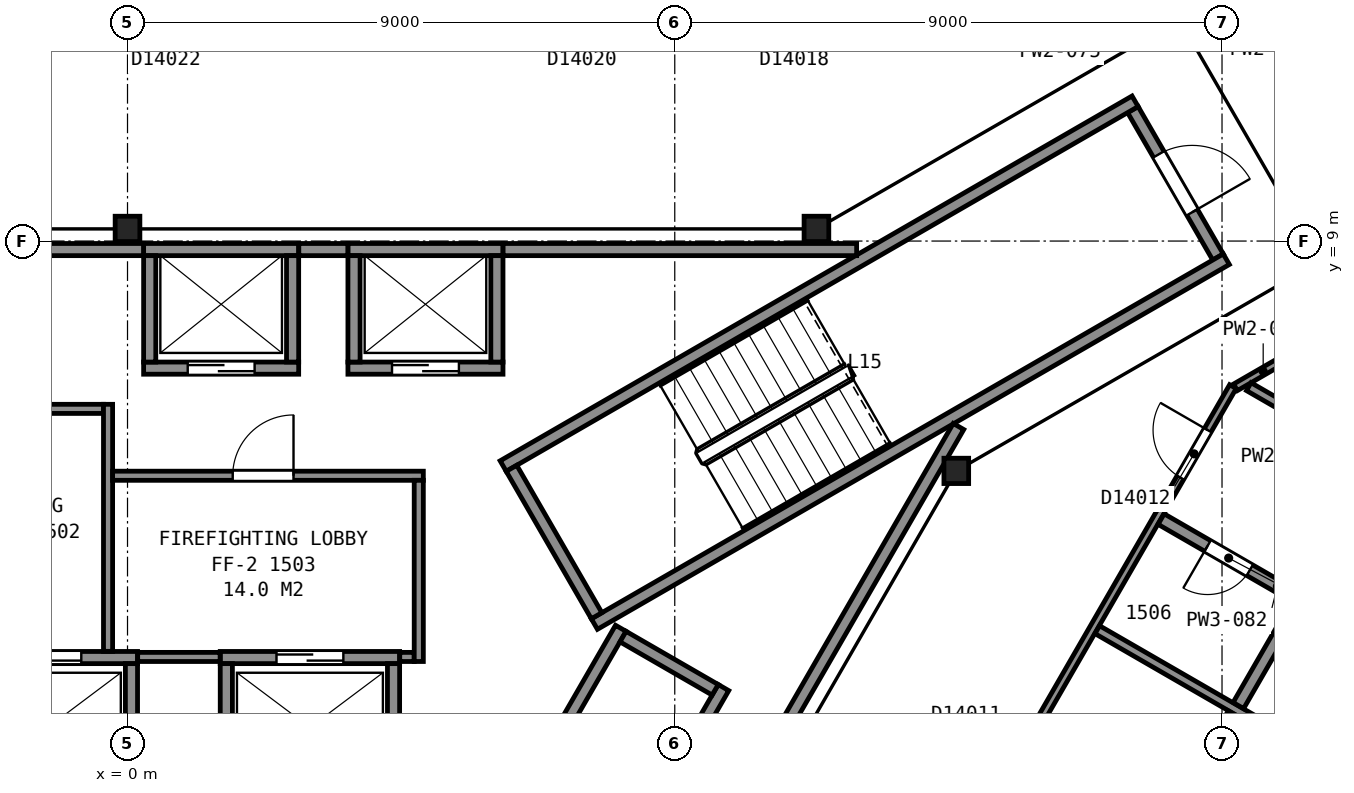
"""IFC4 building model, lengths in metres.
Left out: names, types, materials, properties, quantities, classifications, styles, units other than length and angle.
Written with IfcOpenShell. Run it as: python <this file> out.ifc"""

import sys

from ifc_helpers import new_model, si_unit, direction, frame, frame_2d, origin, origin_2d, place, context, subcontext, project, spatial, rectangle, i_section, extrude, element, fill, save


model = new_model("IFC4")
c1 = context("Model", 3, precision=1e-05, world=origin(), true_north=direction((0.0, 1.0)))
c2 = subcontext(c1, "Body", "Model", "MODEL_VIEW")
j1 = project(units=[si_unit("LENGTHUNIT", "METRE"), si_unit("PLANEANGLEUNIT", "RADIAN")], contexts=[c1])
p1 = place(None, origin())
s1 = spatial("IfcSite", under=j1, at=p1, CompositionType="ELEMENT")
p2 = place(p1, origin())
s2 = spatial("IfcBuilding", under=s1, at=p2, CompositionType="ELEMENT")
p3 = place(p2, frame((0.0, 0.0, 69.2)))
s3 = spatial("IfcBuildingStorey", under=s2, at=p3, CompositionType="ELEMENT", Elevation=69.2)
for number, where, z_axis, x_axis in (
    (1, (13.63, 5.22, 0.0), (0.0, 0.0, 1.0), (1.0, 0.0, 0.0)),
    (2, (11.33, 9.2, 0.0), (0.0, 0.0, 1.0), (1.0, 0.0, 0.0)),
    (3, (0.0, 9.2, 0.0), (0.0, 0.0, 1.0), (1.0, 0.0, 0.0)),
):
    element("IfcColumn", number, at=place(p3, frame(where, z_axis=z_axis, x_axis=x_axis)), inside=s3, PredefinedType="COLUMN", context=c2, shape_type="SweptSolid", body=[
        extrude(i_section(OverallWidth=0.406, OverallDepth=0.417, WebThickness=0.03, FlangeThickness=0.048, FilletRadius=0.015, at=origin_2d()), origin(), (0.0, 0.0, 1.0), 3.6),
    ])
p4 = place(p3, frame((17.934, 8.738, 0.0), z_axis=(0.0, 0.0, 1.0), x_axis=(-0.49998411664, 0.866034573852, 0.0)))
e4 = element("IfcWall", 4, at=p4, inside=s3, PredefinedType="PARTITIONING", context=c2, shape_type="SweptSolid", body=[
    extrude(rectangle(XDim=2.8, YDim=0.2, at=frame_2d((1.4, 0.0))), origin(), (0.0, 0.0, 1.0), 3.35),
])
p5 = place(p4, frame((0.85, 0.0, 0.0)))
e5 = element("IfcOpeningElement", 5, at=p5, cuts=e4, PredefinedType="OPENING", context=c2, shape_type="SweptSolid", body=[
    extrude(rectangle(XDim=1.1, YDim=2.1, at=frame_2d((0.55, 1.05))), frame((0.0, 0.11, 0.0), z_axis=(0.0, -1.0, 0.0), x_axis=(1.0, 0.0, 0.0)), (0.0, 0.0, 1.0), 0.22),
])
for number, where, z_axis, x_axis in (
    (6, (6.178, 5.299, 0.0), (0.0, 0.0, 1.0), (0.866, 0.5, 0.0)),
    (7, (7.678, 2.701, 0.0), (0.0, 0.0, 1.0), (0.866, 0.5, 0.0)),
):
    element("IfcWall", number, at=place(p3, frame(where, z_axis=z_axis, x_axis=x_axis)), inside=s3, PredefinedType="PARTITIONING", context=c2, shape_type="SweptSolid", body=[
        extrude(rectangle(XDim=12.0, YDim=0.2, at=frame_2d((6.0, 0.0))), origin(), (0.0, 0.0, 1.0), 3.35),
    ])
p6 = place(p3, frame((7.715, 2.838, 0.0), z_axis=(0.0, 0.0, 1.0), x_axis=(-0.500049511043, 0.865996816683, 0.0)))
e8 = element("IfcWall", 8, at=p6, inside=s3, PredefinedType="PARTITIONING", context=c2, shape_type="SweptSolid", body=[
    extrude(rectangle(XDim=2.8, YDim=0.2, at=frame_2d((1.4, 0.0))), origin(), (0.0, 0.0, 1.0), 3.35),
])
p7 = place(p3, frame((-2.785, 2.15, 0.0), z_axis=(0.0, 0.0, 1.0), x_axis=(1.0, 0.0, 0.0)))
e9 = element("IfcWall", 9, at=p7, inside=s3, PredefinedType="PARTITIONING", context=c2, shape_type="SweptSolid", body=[
    extrude(rectangle(XDim=2.95, YDim=0.2, at=frame_2d((1.475, 0.0))), origin(), (0.0, 0.0, 1.0), 3.6),
])
p8 = place(p7, frame((0.925, 0.0, 0.0)))
e10 = element("IfcOpeningElement", 10, at=p8, cuts=e9, PredefinedType="OPENING", context=c2, shape_type="SweptSolid", body=[
    extrude(rectangle(XDim=1.1, YDim=2.1, at=frame_2d((0.55, 1.05))), frame((0.0, 0.11, 0.0), z_axis=(0.0, -1.0, 0.0), x_axis=(1.0, 0.0, 0.0)), (0.0, 0.0, 1.0), 0.22),
])
p9 = place(p3, frame((1.525, 2.15, 0.0), z_axis=(0.0, 0.0, 1.0), x_axis=(1.0, 0.0, 0.0)))
e11 = element("IfcWall", 11, at=p9, inside=s3, PredefinedType="PARTITIONING", context=c2, shape_type="SweptSolid", body=[
    extrude(rectangle(XDim=2.95, YDim=0.2, at=frame_2d((1.475, 0.0))), origin(), (0.0, 0.0, 1.0), 3.6),
])
p10 = place(p9, frame((0.925, 0.0, 0.0)))
e12 = element("IfcOpeningElement", 12, at=p10, cuts=e11, PredefinedType="OPENING", context=c2, shape_type="SweptSolid", body=[
    extrude(rectangle(XDim=1.1, YDim=2.1, at=frame_2d((0.55, 1.05))), frame((0.0, 0.11, 0.0), z_axis=(0.0, -1.0, 0.0), x_axis=(1.0, 0.0, 0.0)), (0.0, 0.0, 1.0), 0.22),
])
p11 = place(p3, frame((0.265, 6.91, 0.0), z_axis=(0.0, 0.0, 1.0), x_axis=(1.0, 0.0, 0.0)))
e13 = element("IfcWall", 13, at=p11, inside=s3, PredefinedType="PARTITIONING", context=c2, shape_type="SweptSolid", body=[
    extrude(rectangle(XDim=2.55, YDim=0.2, at=frame_2d((1.275, 0.0))), origin(), (0.0, 0.0, 1.0), 3.6),
])
p12 = place(p11, frame((0.725, 0.0, 0.0)))
e14 = element("IfcOpeningElement", 14, at=p12, cuts=e13, PredefinedType="OPENING", context=c2, shape_type="SweptSolid", body=[
    extrude(rectangle(XDim=1.1, YDim=2.1, at=frame_2d((0.55, 1.05))), frame((0.0, 0.11, 0.0), z_axis=(0.0, -1.0, 0.0), x_axis=(1.0, 0.0, 0.0)), (0.0, 0.0, 1.0), 0.22),
])
p13 = place(p3, frame((3.625, 6.91, 0.0), z_axis=(0.0, 0.0, 1.0), x_axis=(1.0, 0.0, 0.0)))
e15 = element("IfcWall", 15, at=p13, inside=s3, PredefinedType="PARTITIONING", context=c2, shape_type="SweptSolid", body=[
    extrude(rectangle(XDim=2.55, YDim=0.2, at=frame_2d((1.275, 0.0))), origin(), (0.0, 0.0, 1.0), 3.6),
])
p14 = place(p13, frame((0.725, 0.0, 0.0)))
e16 = element("IfcOpeningElement", 16, at=p14, cuts=e15, PredefinedType="OPENING", context=c2, shape_type="SweptSolid", body=[
    extrude(rectangle(XDim=1.1, YDim=2.1, at=frame_2d((0.55, 1.05))), frame((0.0, 0.11, 0.0), z_axis=(0.0, -1.0, 0.0), x_axis=(1.0, 0.0, 0.0)), (0.0, 0.0, 1.0), 0.22),
])
for number, where, z_axis, x_axis in (
    (17, (0.265, 8.86, 0.0), (0.0, 0.0, 1.0), (1.0, 0.0, 0.0)),
    (18, (3.625, 8.86, 0.0), (0.0, 0.0, 1.0), (1.0, 0.0, 0.0)),
):
    element("IfcWall", number, at=place(p3, frame(where, z_axis=z_axis, x_axis=x_axis)), inside=s3, PredefinedType="PARTITIONING", context=c2, shape_type="SweptSolid", body=[
        extrude(rectangle(XDim=2.55, YDim=0.2, at=frame_2d((1.275, 0.0))), origin(), (0.0, 0.0, 1.0), 3.6),
    ])
p15 = place(p3, frame((7.451, -2.414, 0.0), z_axis=(0.0, 0.0, 1.0), x_axis=(0.500016218704, 0.866016039709, 0.0)))
e19 = element("IfcWall", 19, at=p15, inside=s3, PredefinedType="PARTITIONING", context=c2, shape_type="SweptSolid", body=[
    extrude(rectangle(XDim=4.7, YDim=0.2, at=frame_2d((2.35, 0.0))), origin(), (0.0, 0.0, 1.0), 3.6),
])
p16 = place(p3, frame((5.663, -1.612, 0.0), z_axis=(0.0, 0.0, 1.0), x_axis=(0.49998122708, 0.866036242063, 0.0)))
e20 = element("IfcWall", 20, at=p16, inside=s3, PredefinedType="PARTITIONING", context=c2, shape_type="SweptSolid", body=[
    extrude(rectangle(XDim=4.9, YDim=0.2, at=frame_2d((2.45, 0.0))), origin(), (0.0, 0.0, 1.0), 3.6),
])
p17 = place(p3, frame((6.075, 7.01, 0.0), z_axis=(0.0, 0.0, 1.0), x_axis=(0.0, 1.0, 0.0)))
e21 = element("IfcWall", 21, at=p17, inside=s3, PredefinedType="PARTITIONING", context=c2, shape_type="SweptSolid", body=[
    extrude(rectangle(XDim=1.75, YDim=0.2, at=frame_2d((0.875, 0.0))), origin(), (0.0, 0.0, 1.0), 3.6),
])
p18 = place(p3, frame((4.375, 0.1, 0.0), z_axis=(0.0, 0.0, 1.0), x_axis=(0.0, 1.0, 0.0)))
e22 = element("IfcWall", 22, at=p18, inside=s3, PredefinedType="PARTITIONING", context=c2, shape_type="SweptSolid", body=[
    extrude(rectangle(XDim=1.95, YDim=0.2, at=frame_2d((0.975, 0.0))), origin(), (0.0, 0.0, 1.0), 3.6),
])
for number, where, z_axis, x_axis in (
    (23, (3.725, 7.01, 0.0), (0.0, 0.0, 1.0), (0.0, 1.0, 0.0)),
    (24, (2.715, 7.01, 0.0), (0.0, 0.0, 1.0), (0.0, 1.0, 0.0)),
):
    element("IfcWall", number, at=place(p3, frame(where, z_axis=z_axis, x_axis=x_axis)), inside=s3, PredefinedType="PARTITIONING", context=c2, shape_type="SweptSolid", body=[
        extrude(rectangle(XDim=1.75, YDim=0.2, at=frame_2d((0.875, 0.0))), origin(), (0.0, 0.0, 1.0), 3.6),
    ])
p19 = place(p3, frame((1.625, 0.1, 0.0), z_axis=(0.0, 0.0, 1.0), x_axis=(0.0, 1.0, 0.0)))
e25 = element("IfcWall", 25, at=p19, inside=s3, PredefinedType="PARTITIONING", context=c2, shape_type="SweptSolid", body=[
    extrude(rectangle(XDim=1.95, YDim=0.2, at=frame_2d((0.975, 0.0))), origin(), (0.0, 0.0, 1.0), 3.6),
])
p20 = place(p3, frame((0.365, 7.01, 0.0), z_axis=(0.0, 0.0, 1.0), x_axis=(0.0, 1.0, 0.0)))
e26 = element("IfcWall", 26, at=p20, inside=s3, PredefinedType="PARTITIONING", context=c2, shape_type="SweptSolid", body=[
    extrude(rectangle(XDim=1.75, YDim=0.2, at=frame_2d((0.875, 0.0))), origin(), (0.0, 0.0, 1.0), 3.6),
])
p21 = place(p3, frame((0.065, 0.1, 0.0), z_axis=(0.0, 0.0, 1.0), x_axis=(0.0, 1.0, 0.0)))
e27 = element("IfcWall", 27, at=p21, inside=s3, PredefinedType="PARTITIONING", context=c2, shape_type="SweptSolid", body=[
    extrude(rectangle(XDim=1.95, YDim=0.2, at=frame_2d((0.975, 0.0))), origin(), (0.0, 0.0, 1.0), 3.6),
])
p22 = place(p3, frame((9.665, 1.62, 0.0), z_axis=(0.0, 0.0, 1.0), x_axis=(-0.866002029911, 0.500040482552, 0.0)))
e28 = element("IfcWall", 28, at=p22, inside=s3, PredefinedType="PARTITIONING", context=c2, shape_type="SweptSolid", body=[
    extrude(rectangle(XDim=1.75, YDim=0.2, at=frame_2d((0.875, 0.0))), origin(), (0.0, 0.0, 1.0), 3.6),
])
p23 = place(p3, frame((0.263, 8.86, 0.0), z_axis=(0.0, 0.0, 1.0), x_axis=(-1.0, 0.0, 0.0)))
e29 = element("IfcWall", 29, at=p23, inside=s3, PredefinedType="PARTITIONING", context=c2, shape_type="SweptSolid", body=[
    extrude(rectangle(XDim=12.254, YDim=0.2, at=frame_2d((6.127, 0.0))), origin(), (0.0, 0.0, 1.0), 3.35),
])
p24 = place(p23, frame((5.709, 0.0, 0.0)))
e30 = element("IfcOpeningElement", 30, at=p24, cuts=e29, PredefinedType="OPENING", context=c2, shape_type="SweptSolid", body=[
    extrude(rectangle(XDim=1.8, YDim=2.1, at=frame_2d((0.9, 1.05))), frame((0.0, 0.11, 0.0), z_axis=(0.0, -1.0, 0.0), x_axis=(1.0, 0.0, 0.0)), (0.0, 0.0, 1.0), 0.22),
])
p25 = place(p3, frame((-3.933, 6.24, 0.0), z_axis=(0.0, 0.0, 1.0), x_axis=(1.0, 0.0, 0.0)))
e31 = element("IfcWall", 31, at=p25, inside=s3, PredefinedType="PARTITIONING", context=c2, shape_type="SweptSolid", body=[
    extrude(rectangle(XDim=3.538, YDim=0.15, at=frame_2d((1.769, 0.0))), origin(), (0.0, 0.0, 1.0), 3.35),
])
p26 = place(p25, frame((1.3, 0.0, 0.0)))
e32 = element("IfcOpeningElement", 32, at=p26, cuts=e31, PredefinedType="OPENING", context=c2, shape_type="SweptSolid", body=[
    extrude(rectangle(XDim=1.0, YDim=2.1, at=frame_2d((0.5, 1.05))), frame((0.0, 0.085, 0.0), z_axis=(0.0, -1.0, 0.0), x_axis=(1.0, 0.0, 0.0)), (0.0, 0.0, 1.0), 0.17),
])
p27 = place(p3, frame((-0.32, 2.252, 0.0), z_axis=(0.0, 0.0, 1.0), x_axis=(0.0, 1.0, 0.0)))
e33 = element("IfcWall", 33, at=p27, inside=s3, PredefinedType="PARTITIONING", context=c2, shape_type="SweptSolid", body=[
    extrude(rectangle(XDim=4.063, YDim=0.15, at=frame_2d((2.031, 0.0))), origin(), (0.0, 0.0, 1.0), 3.35),
])
p28 = place(p3, frame((-0.245, 5.14, 0.0), z_axis=(0.0, 0.0, 1.0), x_axis=(1.0, 0.0, 0.0)))
e34 = element("IfcWall", 34, at=p28, inside=s3, PredefinedType="PARTITIONING", context=c2, shape_type="SweptSolid", body=[
    extrude(rectangle(XDim=5.11, YDim=0.15, at=frame_2d((2.555, 0.0))), origin(), (0.0, 0.0, 1.0), 3.35),
])
p29 = place(p28, frame((1.975, 0.0, 0.0)))
e35 = element("IfcOpeningElement", 35, at=p29, cuts=e34, PredefinedType="OPENING", context=c2, shape_type="SweptSolid", body=[
    extrude(rectangle(XDim=1.0, YDim=2.1, at=frame_2d((0.5, 1.05))), frame((0.0, 0.085, 0.0), z_axis=(0.0, -1.0, 0.0), x_axis=(1.0, 0.0, 0.0)), (0.0, 0.0, 1.0), 0.17),
])
p30 = place(p3, frame((0.167, 2.16, 0.0), z_axis=(0.0, 0.0, 1.0), x_axis=(1.0, 0.0, 0.0)))
e36 = element("IfcWall", 36, at=p30, inside=s3, PredefinedType="PARTITIONING", context=c2, shape_type="SweptSolid", body=[
    extrude(rectangle(XDim=1.356, YDim=0.15, at=frame_2d((0.678, 0.0))), origin(), (0.0, 0.0, 1.0), 3.35),
])
p31 = place(p3, frame((2.817, 8.86, 0.0), z_axis=(0.0, 0.0, 1.0), x_axis=(1.0, 0.0, 0.0)))
e37 = element("IfcWall", 37, at=p31, inside=s3, PredefinedType="PARTITIONING", context=c2, shape_type="SweptSolid", body=[
    extrude(rectangle(XDim=0.806, YDim=0.2, at=frame_2d((0.403, 0.0))), origin(), (0.0, 0.0, 1.0), 3.35),
])
p32 = place(p3, frame((4.477, 2.16, 0.0), z_axis=(0.0, 0.0, 1.0), x_axis=(1.0, 0.0, 0.0)))
e38 = element("IfcWall", 38, at=p32, inside=s3, PredefinedType="PARTITIONING", context=c2, shape_type="SweptSolid", body=[
    extrude(rectangle(XDim=0.238, YDim=0.15, at=frame_2d((0.119, 0.0))), origin(), (0.0, 0.0, 1.0), 3.35),
])
p33 = place(p3, frame((4.79, 2.085, 0.0), z_axis=(0.0, 0.0, 1.0), x_axis=(0.0, 1.0, 0.0)))
e39 = element("IfcWall", 39, at=p33, inside=s3, PredefinedType="PARTITIONING", context=c2, shape_type="SweptSolid", body=[
    extrude(rectangle(XDim=2.98, YDim=0.15, at=frame_2d((1.49, 0.0))), origin(), (0.0, 0.0, 1.0), 3.35),
])
p34 = place(p3, frame((6.177, 8.86, 0.0), z_axis=(0.0, 0.0, 1.0), x_axis=(1.0, 0.0, 0.0)))
e40 = element("IfcWall", 40, at=p34, inside=s3, PredefinedType="PARTITIONING", context=c2, shape_type="SweptSolid", body=[
    extrude(rectangle(XDim=5.814, YDim=0.2, at=frame_2d((2.907, 0.0))), origin(), (0.0, 0.0, 1.0), 3.35),
])
p35 = place(p3, frame((8.492, -3.012, 0.0), z_axis=(0.0, 0.0, 1.0), x_axis=(0.499972957231, 0.866041016371, 0.0)))
e41 = element("IfcWall", 41, at=p35, inside=s3, PredefinedType="PARTITIONING", context=c2, shape_type="SweptSolid", body=[
    extrude(rectangle(XDim=10.349, YDim=0.2, at=frame_2d((5.174, 0.0))), origin(), (0.0, 0.0, 1.0), 3.35),
])
p36 = place(p3, frame((18.179, 6.606, 0.0), z_axis=(0.0, 0.0, 1.0), x_axis=(-0.500003973642, -0.866023109589, 0.0)))
e42 = element("IfcWall", 42, at=p36, inside=s3, PredefinedType="PARTITIONING", context=c2, shape_type="SweptSolid", body=[
    extrude(rectangle(XDim=28.826, YDim=0.125, at=frame_2d((14.413, 0.0))), origin(), (0.0, 0.0, 1.0), 2.613),
])
p37 = place(p36, frame((21.501, 0.0, 0.0)))
e43 = element("IfcOpeningElement", 43, at=p37, cuts=e42, PredefinedType="OPENING", context=c2, shape_type="SweptSolid", body=[
    extrude(rectangle(XDim=0.9, YDim=2.1, at=frame_2d((0.45, 1.05))), frame((0.0, 0.073, 0.0), z_axis=(0.0, -1.0, 0.0), x_axis=(1.0, 0.0, 0.0)), (0.0, 0.0, 1.0), 0.145),
])
p38 = place(p36, frame((18.894, 0.0, 0.0)))
e44 = element("IfcOpeningElement", 44, at=p38, cuts=e42, PredefinedType="OPENING", context=c2, shape_type="SweptSolid", body=[
    extrude(rectangle(XDim=0.9, YDim=2.1, at=frame_2d((0.45, 1.05))), frame((0.0, 0.073, 0.0), z_axis=(0.0, -1.0, 0.0), x_axis=(1.0, 0.0, 0.0)), (0.0, 0.0, 1.0), 0.145),
])
p39 = place(p36, frame((10.937, 0.0, 0.0)))
e45 = element("IfcOpeningElement", 45, at=p39, cuts=e42, PredefinedType="OPENING", context=c2, shape_type="SweptSolid", body=[
    extrude(rectangle(XDim=0.9, YDim=2.1, at=frame_2d((0.45, 1.05))), frame((0.0, 0.073, 0.0), z_axis=(0.0, -1.0, 0.0), x_axis=(1.0, 0.0, 0.0)), (0.0, 0.0, 1.0), 0.145),
])
p40 = place(p36, frame((7.535, 0.0, 0.0)))
e46 = element("IfcOpeningElement", 46, at=p40, cuts=e42, PredefinedType="OPENING", context=c2, shape_type="SweptSolid", body=[
    extrude(rectangle(XDim=0.9, YDim=2.1, at=frame_2d((0.45, 1.05))), frame((0.0, 0.073, 0.0), z_axis=(0.0, -1.0, 0.0), x_axis=(1.0, 0.0, 0.0)), (0.0, 0.0, 1.0), 0.145),
])
p41 = place(p36, frame((0.827, 0.0, 0.0)))
e47 = element("IfcOpeningElement", 47, at=p41, cuts=e42, PredefinedType="OPENING", context=c2, shape_type="SweptSolid", body=[
    extrude(rectangle(XDim=0.9, YDim=2.1, at=frame_2d((0.45, 1.05))), frame((0.0, 0.073, 0.0), z_axis=(0.0, -1.0, 0.0), x_axis=(1.0, 0.0, 0.0)), (0.0, 0.0, 1.0), 0.145),
])
p42 = place(p3, frame((15.948, 2.608, 0.0), z_axis=(0.0, 0.0, 1.0), x_axis=(0.866059124033, -0.499941590267, 0.0)))
e48 = element("IfcWall", 48, at=p42, inside=s3, PredefinedType="PARTITIONING", context=c2, shape_type="SweptSolid", body=[
    extrude(rectangle(XDim=8.487, YDim=0.15, at=frame_2d((4.243, 0.0))), origin(), (0.0, 0.0, 1.0), 2.613),
])
p43 = place(p3, frame((19.366, 3.061, 0.0), z_axis=(0.0, 0.0, 1.0), x_axis=(-0.866102295869, 0.499866795347, 0.0)))
e49 = element("IfcWall", 49, at=p43, inside=s3, PredefinedType="PARTITIONING", context=c2, shape_type="SweptSolid", body=[
    extrude(rectangle(XDim=2.733, YDim=0.2, at=frame_2d((1.367, 0.0))), origin(), (0.0, 0.0, 1.0), 2.613),
])
p44 = place(p43, frame((1.051, 0.0, 0.0)))
e50 = element("IfcOpeningElement", 50, at=p44, cuts=e49, PredefinedType="OPENING", context=c2, shape_type="SweptSolid", body=[
    extrude(rectangle(XDim=0.8, YDim=2.1, at=frame_2d((0.4, 1.05))), frame((0.0, 0.11, 0.0), z_axis=(0.0, -1.0, 0.0), x_axis=(1.0, 0.0, 0.0)), (0.0, 0.0, 1.0), 0.22),
])
p45 = place(p3, frame((17.229, -0.44, 0.0), z_axis=(0.0, 0.0, 1.0), x_axis=(0.499667418833, 0.866217334482, 0.0)))
e51 = element("IfcWall", 51, at=p45, inside=s3, PredefinedType="PARTITIONING", context=c2, shape_type="SweptSolid", body=[
    extrude(rectangle(XDim=1.92, YDim=0.2, at=frame_2d((0.96, 0.0))), origin(), (0.0, 0.0, 1.0), 2.613),
])
p46 = place(p3, frame((18.222, 6.594, 0.0), z_axis=(0.0, 0.0, 1.0), x_axis=(0.865876245925, 0.500258260045, 0.0)))
e52 = element("IfcWall", 52, at=p46, inside=s3, PredefinedType="PARTITIONING", context=c2, shape_type="SweptSolid", body=[
    extrude(rectangle(XDim=1.052, YDim=0.125, at=frame_2d((0.526, 0.0))), origin(), (0.0, 0.0, 1.0), 2.613),
])
p47 = place(p3, frame((18.269, 1.361, 0.0), z_axis=(0.0, 0.0, 1.0), x_axis=(0.499993829411, 0.866028966346, 0.0)))
e53 = element("IfcWall", 53, at=p47, inside=s3, PredefinedType="PARTITIONING", context=c2, shape_type="SweptSolid", body=[
    extrude(rectangle(XDim=1.921, YDim=0.2, at=frame_2d((0.96, 0.0))), origin(), (0.0, 0.0, 1.0), 2.613),
])
p48 = place(p3, frame((18.44, 6.605, 0.0), z_axis=(0.0, 0.0, 1.0), x_axis=(0.866044499518, -0.49996692376, 0.0)))
e54 = element("IfcWall", 54, at=p48, inside=s3, PredefinedType="PARTITIONING", context=c2, shape_type="SweptSolid", body=[
    extrude(rectangle(XDim=8.328, YDim=0.15, at=frame_2d((4.164, 0.0))), origin(), (0.0, 0.0, 1.0), 2.613),
])
p49 = place(p5, origin())
e55 = element("IfcDoor", 55, at=p49, inside=s3, OperationType="SINGLE_SWING_LEFT", PredefinedType="DOOR", context=c2, shape_type="SweptSolid", body=[
    extrude(rectangle(XDim=1.1, YDim=2.1, at=frame_2d((0.55, 1.05))), frame((0.0, 0.025, 0.0), z_axis=(0.0, -1.0, 0.0), x_axis=(1.0, 0.0, 0.0)), (0.0, 0.0, 1.0), 0.05),
])
fill(e5, e55)
p50 = place(p12, origin())
e56 = element("IfcDoor", 56, at=p50, inside=s3, OperationType="SLIDING_TO_LEFT", PredefinedType="DOOR", context=c2, shape_type="SweptSolid", body=[
    extrude(rectangle(XDim=1.1, YDim=2.1, at=frame_2d((0.55, 1.05))), frame((0.0, 0.025, 0.0), z_axis=(0.0, -1.0, 0.0), x_axis=(1.0, 0.0, 0.0)), (0.0, 0.0, 1.0), 0.05),
])
fill(e14, e56)
p51 = place(p14, origin())
e57 = element("IfcDoor", 57, at=p51, inside=s3, OperationType="SLIDING_TO_LEFT", PredefinedType="DOOR", context=c2, shape_type="SweptSolid", body=[
    extrude(rectangle(XDim=1.1, YDim=2.1, at=frame_2d((0.55, 1.05))), frame((0.0, 0.025, 0.0), z_axis=(0.0, -1.0, 0.0), x_axis=(1.0, 0.0, 0.0)), (0.0, 0.0, 1.0), 0.05),
])
fill(e16, e57)
p52 = place(p8, origin())
e58 = element("IfcDoor", 58, at=p52, inside=s3, OperationType="SLIDING_TO_LEFT", PredefinedType="DOOR", context=c2, shape_type="SweptSolid", body=[
    extrude(rectangle(XDim=1.1, YDim=2.1, at=frame_2d((0.55, 1.05))), frame((0.0, 0.025, 0.0), z_axis=(0.0, -1.0, 0.0), x_axis=(1.0, 0.0, 0.0)), (0.0, 0.0, 1.0), 0.05),
])
fill(e10, e58)
p53 = place(p10, origin())
e59 = element("IfcDoor", 59, at=p53, inside=s3, OperationType="SLIDING_TO_RIGHT", PredefinedType="DOOR", context=c2, shape_type="SweptSolid", body=[
    extrude(rectangle(XDim=1.1, YDim=2.1, at=frame_2d((0.55, 1.05))), frame((0.0, 0.025, 0.0), z_axis=(0.0, -1.0, 0.0), x_axis=(1.0, 0.0, 0.0)), (0.0, 0.0, 1.0), 0.05),
])
fill(e12, e59)
p54 = place(p29, origin())
e60 = element("IfcDoor", 60, at=p54, inside=s3, OperationType="SINGLE_SWING_RIGHT", PredefinedType="DOOR", context=c2, shape_type="SweptSolid", body=[
    extrude(rectangle(XDim=1.0, YDim=2.1, at=frame_2d((0.5, 1.05))), frame((0.0, 0.025, 0.0), z_axis=(0.0, -1.0, 0.0), x_axis=(1.0, 0.0, 0.0)), (0.0, 0.0, 1.0), 0.05),
])
fill(e35, e60)
p55 = place(p41, origin())
e61 = element("IfcDoor", 61, at=p55, inside=s3, OperationType="SINGLE_SWING_LEFT", PredefinedType="DOOR", context=c2, shape_type="SweptSolid", body=[
    extrude(rectangle(XDim=0.9, YDim=2.1, at=frame_2d((0.45, 1.05))), frame((0.0, 0.025, 0.0), z_axis=(0.0, -1.0, 0.0), x_axis=(1.0, 0.0, 0.0)), (0.0, 0.0, 1.0), 0.05),
])
fill(e47, e61)
p56 = place(p44, origin())
e62 = element("IfcDoor", 62, at=p56, inside=s3, OperationType="SINGLE_SWING_RIGHT", PredefinedType="DOOR", context=c2, shape_type="SweptSolid", body=[
    extrude(rectangle(XDim=0.8, YDim=2.1, at=frame_2d((0.4, 1.05))), frame((0.0, 0.025, 0.0), z_axis=(0.0, -1.0, 0.0), x_axis=(1.0, 0.0, 0.0)), (0.0, 0.0, 1.0), 0.05),
])
fill(e50, e62)
save(model, sys.argv[1])
